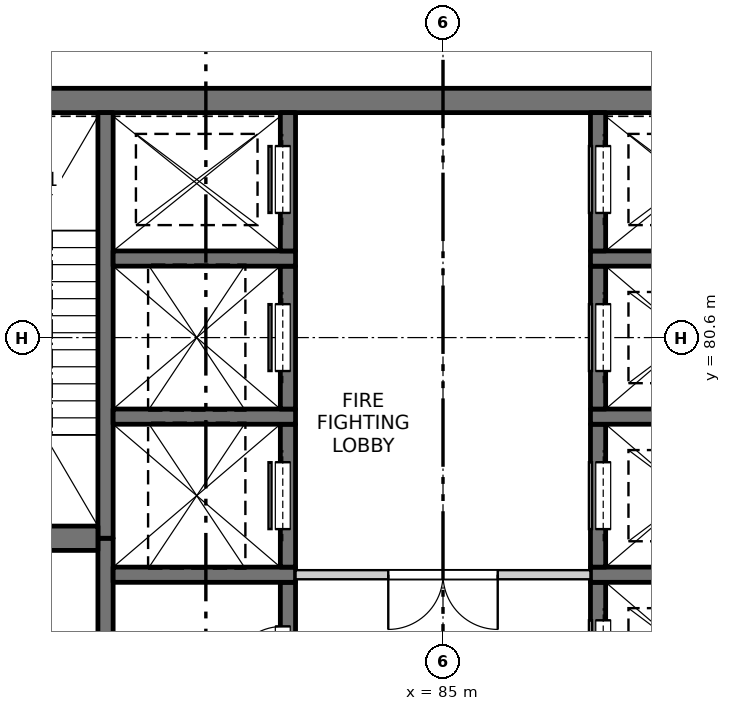
"""IFC4 building model, lengths in metres.
Left out: names, types, materials, properties, quantities, classifications, styles, units other than length and angle.
Written with IfcOpenShell. Run it as: python <this file> out.ifc"""

import sys

from ifc_helpers import new_model, si_unit, direction, frame, frame_2d, origin, place, context, subcontext, project, spatial, rectangle, extrude, element, fill, save


model = new_model("IFC4")
c1 = context("Model", 3, precision=1e-05, world=origin(), true_north=direction((0.0, 1.0)))
c2 = subcontext(c1, "Body", "Model", "MODEL_VIEW")
j1 = project(units=[si_unit("LENGTHUNIT", "METRE"), si_unit("PLANEANGLEUNIT", "RADIAN")], contexts=[c1])
p1 = place(None, origin())
s1 = spatial("IfcSite", under=j1, at=p1, CompositionType="ELEMENT")
p2 = place(p1, origin())
s2 = spatial("IfcBuilding", under=s1, at=p2, CompositionType="ELEMENT")
p3 = place(p2, frame((0.0, 0.0, 241.5)))
s3 = spatial("IfcBuildingStorey", under=s2, at=p3, CompositionType="ELEMENT", Elevation=241.5)
p4 = place(p3, frame((75.45, 84.5, -0.3), z_axis=(0.0, 0.0, 1.0), x_axis=(1.0, 0.0, 0.0)))
e1 = element("IfcWall", 1, at=p4, inside=s3, PredefinedType="SOLIDWALL", context=c2, shape_type="SweptSolid", body=[
    extrude(rectangle(XDim=19.1, YDim=0.4, at=frame_2d((9.55, 0.0))), origin(), (0.0, 0.0, 1.0), 4.5),
])
p5 = place(p3, frame((79.45, 60.975, -0.3), z_axis=(0.0, 0.0, 1.0), x_axis=(0.0, 1.0, 0.0)))
e2 = element("IfcWall", 2, at=p5, inside=s3, PredefinedType="SOLIDWALL", context=c2, shape_type="SweptSolid", body=[
    extrude(rectangle(XDim=16.325, YDim=0.25, at=frame_2d((8.163, 0.0))), origin(), (0.0, 0.0, 1.0), 4.5),
])
p6 = place(p3, frame((79.45, 77.3, -0.3), z_axis=(0.0, 0.0, 1.0), x_axis=(0.0, 1.0, 0.0)))
e3 = element("IfcWall", 3, at=p6, inside=s3, PredefinedType="SOLIDWALL", context=c2, shape_type="SweptSolid", body=[
    extrude(rectangle(XDim=7.0, YDim=0.25, at=frame_2d((3.5, 0.0))), origin(), (0.0, 0.0, 1.0), 4.5),
])
p7 = place(p3, frame((82.45, 74.225, -0.3), z_axis=(0.0, 0.0, 1.0), x_axis=(0.0, 1.0, 0.0)))
e4 = element("IfcWall", 4, at=p7, inside=s3, PredefinedType="SOLIDWALL", context=c2, shape_type="SweptSolid", body=[
    extrude(rectangle(XDim=2.35, YDim=0.25, at=frame_2d((1.175, 0.0))), origin(), (0.0, 0.0, 1.0), 4.5),
])
p8 = place(p7, frame((0.725, 0.0, 0.3)))
e5 = element("IfcOpeningElement", 5, at=p8, cuts=e4, PredefinedType="OPENING", context=c2, shape_type="SweptSolid", body=[
    extrude(rectangle(XDim=0.9, YDim=2.1, at=frame_2d((0.45, 1.05))), frame((0.0, 0.135, 0.0), z_axis=(0.0, -1.0, 0.0), x_axis=(1.0, 0.0, 0.0)), (0.0, 0.0, 1.0), 0.27),
])
p9 = place(p3, frame((79.575, 76.7, -0.3), z_axis=(0.0, 0.0, 1.0), x_axis=(1.0, 0.0, 0.0)))
e6 = element("IfcWall", 6, at=p9, inside=s3, PredefinedType="SOLIDWALL", context=c2, shape_type="SweptSolid", body=[
    extrude(rectangle(XDim=3.0, YDim=0.25, at=frame_2d((1.5, 0.0))), origin(), (0.0, 0.0, 1.0), 4.5),
])
p10 = place(p3, frame((82.45, 76.825, -0.3), z_axis=(0.0, 0.0, 1.0), x_axis=(0.0, 1.0, 0.0)))
e7 = element("IfcWall", 7, at=p10, inside=s3, PredefinedType="SOLIDWALL", context=c2, shape_type="SweptSolid", body=[
    extrude(rectangle(XDim=2.35, YDim=0.25, at=frame_2d((1.175, 0.0))), origin(), (0.0, 0.0, 1.0), 4.5),
])
p11 = place(p10, frame((0.625, 0.0, 0.3)))
e8 = element("IfcOpeningElement", 8, at=p11, cuts=e7, PredefinedType="OPENING", context=c2, shape_type="SweptSolid", body=[
    extrude(rectangle(XDim=1.1, YDim=2.1, at=frame_2d((0.55, 1.05))), frame((0.0, 0.135, 0.0), z_axis=(0.0, -1.0, 0.0), x_axis=(1.0, 0.0, 0.0)), (0.0, 0.0, 1.0), 0.27),
])
p12 = place(p3, frame((79.575, 79.3, -0.3), z_axis=(0.0, 0.0, 1.0), x_axis=(1.0, 0.0, 0.0)))
e9 = element("IfcWall", 9, at=p12, inside=s3, PredefinedType="SOLIDWALL", context=c2, shape_type="SweptSolid", body=[
    extrude(rectangle(XDim=3.0, YDim=0.25, at=frame_2d((1.5, 0.0))), origin(), (0.0, 0.0, 1.0), 4.5),
])
p13 = place(p3, frame((82.45, 79.425, -0.3), z_axis=(0.0, 0.0, 1.0), x_axis=(0.0, 1.0, 0.0)))
e10 = element("IfcWall", 10, at=p13, inside=s3, PredefinedType="SOLIDWALL", context=c2, shape_type="SweptSolid", body=[
    extrude(rectangle(XDim=2.35, YDim=0.25, at=frame_2d((1.175, 0.0))), origin(), (0.0, 0.0, 1.0), 4.5),
])
p14 = place(p13, frame((0.625, 0.0, 0.3)))
e11 = element("IfcOpeningElement", 11, at=p14, cuts=e10, PredefinedType="OPENING", context=c2, shape_type="SweptSolid", body=[
    extrude(rectangle(XDim=1.1, YDim=2.1, at=frame_2d((0.55, 1.05))), frame((0.0, 0.135, 0.0), z_axis=(0.0, -1.0, 0.0), x_axis=(1.0, 0.0, 0.0)), (0.0, 0.0, 1.0), 0.27),
])
p15 = place(p3, frame((79.575, 81.9, -0.3), z_axis=(0.0, 0.0, 1.0), x_axis=(1.0, 0.0, 0.0)))
e12 = element("IfcWall", 12, at=p15, inside=s3, PredefinedType="SOLIDWALL", context=c2, shape_type="SweptSolid", body=[
    extrude(rectangle(XDim=3.0, YDim=0.25, at=frame_2d((1.5, 0.0))), origin(), (0.0, 0.0, 1.0), 4.5),
])
p16 = place(p3, frame((82.45, 82.025, -0.3), z_axis=(0.0, 0.0, 1.0), x_axis=(0.0, 1.0, 0.0)))
e13 = element("IfcWall", 13, at=p16, inside=s3, PredefinedType="SOLIDWALL", context=c2, shape_type="SweptSolid", body=[
    extrude(rectangle(XDim=2.275, YDim=0.25, at=frame_2d((1.138, 0.0))), origin(), (0.0, 0.0, 1.0), 4.5),
])
p17 = place(p16, frame((0.625, 0.0, 0.3)))
e14 = element("IfcOpeningElement", 14, at=p17, cuts=e13, PredefinedType="OPENING", context=c2, shape_type="SweptSolid", body=[
    extrude(rectangle(XDim=1.1, YDim=2.1, at=frame_2d((0.55, 1.05))), frame((0.0, 0.135, 0.0), z_axis=(0.0, -1.0, 0.0), x_axis=(1.0, 0.0, 0.0)), (0.0, 0.0, 1.0), 0.27),
])
p18 = place(p3, frame((87.55, 74.225, -0.3), z_axis=(0.0, 0.0, 1.0), x_axis=(0.0, 1.0, 0.0)))
e15 = element("IfcWall", 15, at=p18, inside=s3, PredefinedType="SOLIDWALL", context=c2, shape_type="SweptSolid", body=[
    extrude(rectangle(XDim=2.35, YDim=0.25, at=frame_2d((1.175, 0.0))), origin(), (0.0, 0.0, 1.0), 4.5),
])
p19 = place(p18, frame((0.625, 0.0, 0.3)))
e16 = element("IfcOpeningElement", 16, at=p19, cuts=e15, PredefinedType="OPENING", context=c2, shape_type="SweptSolid", body=[
    extrude(rectangle(XDim=1.1, YDim=2.1, at=frame_2d((0.55, 1.05))), frame((0.0, 0.135, 0.0), z_axis=(0.0, -1.0, 0.0), x_axis=(1.0, 0.0, 0.0)), (0.0, 0.0, 1.0), 0.27),
])
p20 = place(p3, frame((87.425, 76.7, -0.3), z_axis=(0.0, 0.0, 1.0), x_axis=(1.0, 0.0, 0.0)))
e17 = element("IfcWall", 17, at=p20, inside=s3, PredefinedType="SOLIDWALL", context=c2, shape_type="SweptSolid", body=[
    extrude(rectangle(XDim=3.0, YDim=0.25, at=frame_2d((1.5, 0.0))), origin(), (0.0, 0.0, 1.0), 4.5),
])
p21 = place(p3, frame((87.55, 76.825, -0.3), z_axis=(0.0, 0.0, 1.0), x_axis=(0.0, 1.0, 0.0)))
e18 = element("IfcWall", 18, at=p21, inside=s3, PredefinedType="SOLIDWALL", context=c2, shape_type="SweptSolid", body=[
    extrude(rectangle(XDim=2.35, YDim=0.25, at=frame_2d((1.175, 0.0))), origin(), (0.0, 0.0, 1.0), 4.5),
])
p22 = place(p21, frame((0.625, 0.0, 0.3)))
e19 = element("IfcOpeningElement", 19, at=p22, cuts=e18, PredefinedType="OPENING", context=c2, shape_type="SweptSolid", body=[
    extrude(rectangle(XDim=1.1, YDim=2.1, at=frame_2d((0.55, 1.05))), frame((0.0, 0.135, 0.0), z_axis=(0.0, -1.0, 0.0), x_axis=(1.0, 0.0, 0.0)), (0.0, 0.0, 1.0), 0.27),
])
p23 = place(p3, frame((87.425, 79.3, -0.3), z_axis=(0.0, 0.0, 1.0), x_axis=(1.0, 0.0, 0.0)))
e20 = element("IfcWall", 20, at=p23, inside=s3, PredefinedType="SOLIDWALL", context=c2, shape_type="SweptSolid", body=[
    extrude(rectangle(XDim=3.0, YDim=0.25, at=frame_2d((1.5, 0.0))), origin(), (0.0, 0.0, 1.0), 4.5),
])
p24 = place(p3, frame((87.55, 79.425, -0.3), z_axis=(0.0, 0.0, 1.0), x_axis=(0.0, 1.0, 0.0)))
e21 = element("IfcWall", 21, at=p24, inside=s3, PredefinedType="SOLIDWALL", context=c2, shape_type="SweptSolid", body=[
    extrude(rectangle(XDim=2.35, YDim=0.25, at=frame_2d((1.175, 0.0))), origin(), (0.0, 0.0, 1.0), 4.5),
])
p25 = place(p24, frame((0.625, 0.0, 0.3)))
e22 = element("IfcOpeningElement", 22, at=p25, cuts=e21, PredefinedType="OPENING", context=c2, shape_type="SweptSolid", body=[
    extrude(rectangle(XDim=1.1, YDim=2.1, at=frame_2d((0.55, 1.05))), frame((0.0, 0.135, 0.0), z_axis=(0.0, -1.0, 0.0), x_axis=(1.0, 0.0, 0.0)), (0.0, 0.0, 1.0), 0.27),
])
p26 = place(p3, frame((87.425, 81.9, -0.3), z_axis=(0.0, 0.0, 1.0), x_axis=(1.0, 0.0, 0.0)))
e23 = element("IfcWall", 23, at=p26, inside=s3, PredefinedType="SOLIDWALL", context=c2, shape_type="SweptSolid", body=[
    extrude(rectangle(XDim=3.0, YDim=0.25, at=frame_2d((1.5, 0.0))), origin(), (0.0, 0.0, 1.0), 4.5),
])
p27 = place(p3, frame((87.55, 82.025, -0.3), z_axis=(0.0, 0.0, 1.0), x_axis=(0.0, 1.0, 0.0)))
e24 = element("IfcWall", 24, at=p27, inside=s3, PredefinedType="SOLIDWALL", context=c2, shape_type="SweptSolid", body=[
    extrude(rectangle(XDim=2.275, YDim=0.25, at=frame_2d((1.138, 0.0))), origin(), (0.0, 0.0, 1.0), 4.5),
])
p28 = place(p27, frame((0.625, 0.0, 0.3)))
e25 = element("IfcOpeningElement", 25, at=p28, cuts=e24, PredefinedType="OPENING", context=c2, shape_type="SweptSolid", body=[
    extrude(rectangle(XDim=1.1, YDim=2.1, at=frame_2d((0.55, 1.05))), frame((0.0, 0.135, 0.0), z_axis=(0.0, -1.0, 0.0), x_axis=(1.0, 0.0, 0.0)), (0.0, 0.0, 1.0), 0.27),
])
p29 = place(p3, frame((75.45, 77.3, -0.3), z_axis=(0.0, 0.0, 1.0), x_axis=(1.0, 0.0, 0.0)))
e26 = element("IfcWall", 26, at=p29, inside=s3, PredefinedType="SOLIDWALL", context=c2, shape_type="SweptSolid", body=[
    extrude(rectangle(XDim=3.875, YDim=0.4, at=frame_2d((1.938, 0.0))), origin(), (0.0, 0.0, 1.0), 4.5),
])
p30 = place(p3, frame((82.575, 76.7, 0.0), z_axis=(0.0, 0.0, 1.0), x_axis=(1.0, 0.0, 0.0)))
e27 = element("IfcWall", 27, at=p30, inside=s3, PredefinedType="PARTITIONING", context=c2, shape_type="SweptSolid", body=[
    extrude(rectangle(XDim=4.85, YDim=0.15, at=frame_2d((2.425, 0.0))), origin(), (0.0, 0.0, 1.0), 4.2),
])
p31 = place(p30, frame((1.525, 0.0, 0.0)))
e28 = element("IfcOpeningElement", 28, at=p31, cuts=e27, PredefinedType="OPENING", context=c2, shape_type="SweptSolid", body=[
    extrude(rectangle(XDim=1.8, YDim=2.1, at=frame_2d((0.9, 1.05))), frame((0.0, 0.085, 0.0), z_axis=(0.0, -1.0, 0.0), x_axis=(1.0, 0.0, 0.0)), (0.0, 0.0, 1.0), 0.17),
])
p32 = place(p8, origin())
e29 = element("IfcDoor", 29, at=p32, inside=s3, OperationType="SINGLE_SWING_LEFT", PredefinedType="DOOR", context=c2, shape_type="SweptSolid", body=[
    extrude(rectangle(XDim=0.9, YDim=2.1, at=frame_2d((0.45, 1.05))), frame((0.0, 0.11, 0.0), z_axis=(0.0, -1.0, 0.0), x_axis=(1.0, 0.0, 0.0)), (0.0, 0.0, 1.0), 0.05),
])
fill(e5, e29)
p33 = place(p19, origin())
e30 = element("IfcDoor", 30, at=p33, inside=s3, OperationType="SLIDING_TO_LEFT", PredefinedType="DOOR", context=c2, shape_type="SweptSolid", body=[
    extrude(rectangle(XDim=1.1, YDim=2.1, at=frame_2d((0.55, 1.05))), frame((0.0, -0.06, 0.0), z_axis=(0.0, -1.0, 0.0), x_axis=(1.0, 0.0, 0.0)), (0.0, 0.0, 1.0), 0.05),
])
fill(e16, e30)
p34 = place(p31, origin())
e31 = element("IfcDoor", 31, at=p34, inside=s3, OperationType="DOUBLE_DOOR_SINGLE_SWING", PredefinedType="DOOR", context=c2, shape_type="SweptSolid", body=[
    extrude(rectangle(XDim=1.8, YDim=2.1, at=frame_2d((0.9, 1.05))), frame((0.0, 0.025, 0.0), z_axis=(0.0, -1.0, 0.0), x_axis=(1.0, 0.0, 0.0)), (0.0, 0.0, 1.0), 0.05),
])
fill(e28, e31)
p35 = place(p11, origin())
e32 = element("IfcDoor", 32, at=p35, inside=s3, OperationType="SLIDING_TO_LEFT", PredefinedType="DOOR", context=c2, shape_type="SweptSolid", body=[
    extrude(rectangle(XDim=1.1, YDim=2.1, at=frame_2d((0.55, 1.05))), frame((0.0, 0.11, 0.0), z_axis=(0.0, -1.0, 0.0), x_axis=(1.0, 0.0, 0.0)), (0.0, 0.0, 1.0), 0.05),
])
fill(e8, e32)
p36 = place(p22, origin())
e33 = element("IfcDoor", 33, at=p36, inside=s3, OperationType="SLIDING_TO_LEFT", PredefinedType="DOOR", context=c2, shape_type="SweptSolid", body=[
    extrude(rectangle(XDim=1.1, YDim=2.1, at=frame_2d((0.55, 1.05))), frame((0.0, -0.06, 0.0), z_axis=(0.0, -1.0, 0.0), x_axis=(1.0, 0.0, 0.0)), (0.0, 0.0, 1.0), 0.05),
])
fill(e19, e33)
p37 = place(p14, origin())
e34 = element("IfcDoor", 34, at=p37, inside=s3, OperationType="SLIDING_TO_LEFT", PredefinedType="DOOR", context=c2, shape_type="SweptSolid", body=[
    extrude(rectangle(XDim=1.1, YDim=2.1, at=frame_2d((0.55, 1.05))), frame((0.0, 0.11, 0.0), z_axis=(0.0, -1.0, 0.0), x_axis=(1.0, 0.0, 0.0)), (0.0, 0.0, 1.0), 0.05),
])
fill(e11, e34)
p38 = place(p25, origin())
e35 = element("IfcDoor", 35, at=p38, inside=s3, OperationType="SLIDING_TO_RIGHT", PredefinedType="DOOR", context=c2, shape_type="SweptSolid", body=[
    extrude(rectangle(XDim=1.1, YDim=2.1, at=frame_2d((0.55, 1.05))), frame((0.0, -0.06, 0.0), z_axis=(0.0, -1.0, 0.0), x_axis=(1.0, 0.0, 0.0)), (0.0, 0.0, 1.0), 0.05),
])
fill(e22, e35)
p39 = place(p17, origin())
e36 = element("IfcDoor", 36, at=p39, inside=s3, OperationType="SLIDING_TO_RIGHT", PredefinedType="DOOR", context=c2, shape_type="SweptSolid", body=[
    extrude(rectangle(XDim=1.1, YDim=2.1, at=frame_2d((0.55, 1.05))), frame((0.0, 0.11, 0.0), z_axis=(0.0, -1.0, 0.0), x_axis=(1.0, 0.0, 0.0)), (0.0, 0.0, 1.0), 0.05),
])
fill(e14, e36)
p40 = place(p28, origin())
e37 = element("IfcDoor", 37, at=p40, inside=s3, OperationType="SLIDING_TO_RIGHT", PredefinedType="DOOR", context=c2, shape_type="SweptSolid", body=[
    extrude(rectangle(XDim=1.1, YDim=2.1, at=frame_2d((0.55, 1.05))), frame((0.0, -0.06, 0.0), z_axis=(0.0, -1.0, 0.0), x_axis=(1.0, 0.0, 0.0)), (0.0, 0.0, 1.0), 0.05),
])
fill(e25, e37)
save(model, sys.argv[1])
